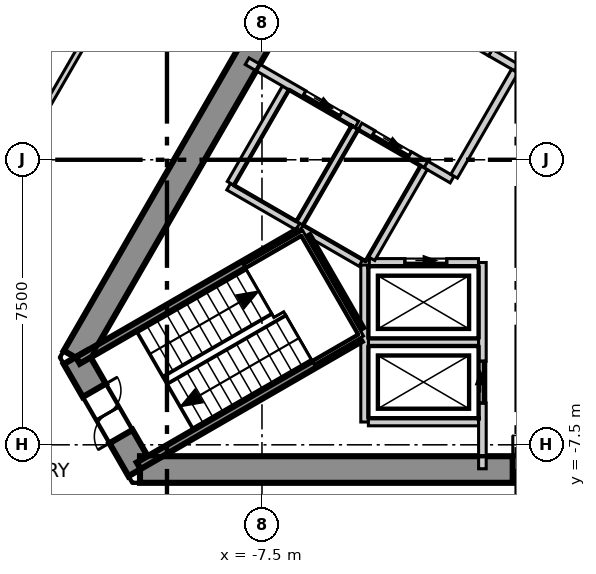
"""IFC4 building model, lengths in metres.
Left out: names, types, materials, properties, quantities, classifications, styles, units other than length and angle.
Written with IfcOpenShell. Run it as: python <this file> out.ifc"""

import sys

from ifc_helpers import new_model, si_unit, direction, frame, frame_2d, origin, place, context, subcontext, project, spatial, polyline, rectangle, outline, extrude, element, fill, save


model = new_model("IFC4")
c1 = context("Model", 3, precision=1e-05, world=origin(), true_north=direction((0.0, 1.0)))
c2 = subcontext(c1, "Body", "Model", "MODEL_VIEW")
j1 = project(units=[si_unit("LENGTHUNIT", "METRE"), si_unit("PLANEANGLEUNIT", "RADIAN")], contexts=[c1])
p1 = place(None, origin())
s1 = spatial("IfcSite", under=j1, at=p1, CompositionType="ELEMENT")
p2 = place(p1, origin())
s2 = spatial("IfcBuilding", under=s1, at=p2, CompositionType="ELEMENT")
p3 = place(p2, frame((0.0, 0.0, 239.3)))
s3 = spatial("IfcBuildingStorey", under=s2, at=p3, CompositionType="ELEMENT", Elevation=239.3)
p4 = place(p3, frame((-1.703, 13.35, -0.3), z_axis=(0.0, 0.0, 1.0), x_axis=(-0.500011533395, -0.866018744874, 0.0)))
e1 = element("IfcWall", 1, at=p4, inside=s3, PredefinedType="SHEAR", context=c2, shape_type="SweptSolid", body=[
    extrude(outline(polyline([(-0.202, -0.35), (1.782, -0.35), (3.766, -0.35), (5.75, -0.35), (7.734, -0.35), (9.718, -0.35), (11.702, -0.35), (13.686, -0.35), (15.67, -0.35), (17.654, -0.35), (19.638, -0.35), (21.622, -0.35), (21.218, 0.35), (19.307, 0.35), (17.397, 0.35), (15.486, 0.35), (13.576, 0.35), (11.665, 0.35), (9.755, 0.35), (7.844, 0.35), (5.934, 0.35), (4.023, 0.35), (2.113, 0.35), (0.202, 0.35), (-0.202, -0.35)])), origin(), (0.0, 0.0, 1.0), 4.0),
])
p5 = place(p4, frame((10.16, 0.0, 0.3)))
e2 = element("IfcOpeningElement", 2, at=p5, cuts=e1, PredefinedType="OPENING", context=c2, shape_type="SweptSolid", body=[
    extrude(rectangle(XDim=1.1, YDim=2.1, at=frame_2d((0.55, 1.05))), frame((0.0, 0.36, 0.0), z_axis=(0.0, -1.0, 0.0), x_axis=(1.0, 0.0, 0.0)), (0.0, 0.0, 1.0), 0.72),
])
p6 = place(p3, frame((-12.413, -5.2, -0.3), z_axis=(0.0, 0.0, 1.0), x_axis=(0.49999337185, -0.866029230515, 0.0)))
e3 = element("IfcWall", 3, at=p6, inside=s3, PredefinedType="SHEAR", context=c2, shape_type="SweptSolid", body=[
    extrude(outline(polyline([(-0.202, -0.35), (1.703, -0.35), (3.608, -0.35), (3.204, 0.35), (1.703, 0.35), (0.202, 0.35), (-0.202, -0.35)])), origin(), (0.0, 0.0, 1.0), 4.0),
])
p7 = place(p6, frame((1.003, 0.0, 0.3)))
e4 = element("IfcOpeningElement", 4, at=p7, cuts=e3, PredefinedType="OPENING", context=c2, shape_type="SweptSolid", body=[
    extrude(rectangle(XDim=1.4, YDim=2.1, at=frame_2d((0.7, 1.05))), frame((0.0, 0.36, 0.0), z_axis=(0.0, -1.0, 0.0), x_axis=(1.0, 0.0, 0.0)), (0.0, 0.0, 1.0), 0.72),
])
p8 = place(p3, frame((-10.71, -8.15, -0.3), z_axis=(0.0, 0.0, 1.0), x_axis=(1.0, 0.0, 0.0)))
e5 = element("IfcWall", 5, at=p8, inside=s3, PredefinedType="SHEAR", context=c2, shape_type="SweptSolid", body=[
    extrude(outline(polyline([(-0.202, -0.35), (1.782, -0.35), (3.766, -0.35), (5.75, -0.35), (7.734, -0.35), (9.718, -0.35), (11.702, -0.35), (13.686, -0.35), (15.67, -0.35), (17.654, -0.35), (19.638, -0.35), (21.622, -0.35), (21.218, 0.35), (19.307, 0.35), (17.397, 0.35), (15.486, 0.35), (13.576, 0.35), (11.665, 0.35), (9.755, 0.35), (7.844, 0.35), (5.934, 0.35), (4.023, 0.35), (2.113, 0.35), (0.202, 0.35), (-0.202, -0.35)])), origin(), (0.0, 0.0, 1.0), 4.0),
])
p9 = place(p8, frame((9.81, 0.0, 0.3)))
e6 = element("IfcOpeningElement", 6, at=p9, cuts=e5, PredefinedType="OPENING", context=c2, shape_type="SweptSolid", body=[
    extrude(rectangle(XDim=1.8, YDim=2.1, at=frame_2d((0.9, 1.05))), frame((0.0, 0.36, 0.0), z_axis=(0.0, -1.0, 0.0), x_axis=(1.0, 0.0, 0.0)), (0.0, 0.0, 1.0), 0.72),
])
p10 = place(p3, frame((-2.687, 29.995, 0.0), z_axis=(0.0, 0.0, 1.0), x_axis=(-0.499992950893, -0.86602947355, 0.0)))
e7 = element("IfcWall", 7, at=p10, inside=s3, PredefinedType="ELEMENTEDWALL", context=c2, shape_type="SweptSolid", body=[
    extrude(rectangle(XDim=49.247, YDim=0.2, at=frame_2d((24.624, 0.0))), origin(), (0.0, 0.0, 1.0), 3.7),
])
p11 = place(p10, frame((2.119, 0.0, 0.9)))
e8 = element("IfcOpeningElement", 8, at=p11, cuts=e7, PredefinedType="OPENING", context=c2, shape_type="SweptSolid", body=[
    extrude(rectangle(XDim=4.2, YDim=2.5, at=frame_2d((2.1, 1.25))), frame((0.0, 0.11, 0.0), z_axis=(0.0, -1.0, 0.0), x_axis=(1.0, 0.0, 0.0)), (0.0, 0.0, 1.0), 0.22),
])
p12 = place(p10, frame((7.951, 0.0, 0.9)))
e9 = element("IfcOpeningElement", 9, at=p12, cuts=e7, PredefinedType="OPENING", context=c2, shape_type="SweptSolid", body=[
    extrude(rectangle(XDim=4.2, YDim=2.5, at=frame_2d((2.1, 1.25))), frame((0.0, 0.11, 0.0), z_axis=(0.0, -1.0, 0.0), x_axis=(1.0, 0.0, 0.0)), (0.0, 0.0, 1.0), 0.22),
])
p13 = place(p10, frame((13.784, 0.0, 0.9)))
e10 = element("IfcOpeningElement", 10, at=p13, cuts=e7, PredefinedType="OPENING", context=c2, shape_type="SweptSolid", body=[
    extrude(rectangle(XDim=4.2, YDim=2.5, at=frame_2d((2.1, 1.25))), frame((0.0, 0.11, 0.0), z_axis=(0.0, -1.0, 0.0), x_axis=(1.0, 0.0, 0.0)), (0.0, 0.0, 1.0), 0.22),
])
p14 = place(p10, frame((19.617, 0.0, 0.9)))
e11 = element("IfcOpeningElement", 11, at=p14, cuts=e7, PredefinedType="OPENING", context=c2, shape_type="SweptSolid", body=[
    extrude(rectangle(XDim=4.2, YDim=2.5, at=frame_2d((2.1, 1.25))), frame((0.0, 0.11, 0.0), z_axis=(0.0, -1.0, 0.0), x_axis=(1.0, 0.0, 0.0)), (0.0, 0.0, 1.0), 0.22),
])
p15 = place(p10, frame((25.449, 0.0, 0.9)))
e12 = element("IfcOpeningElement", 12, at=p15, cuts=e7, PredefinedType="OPENING", context=c2, shape_type="SweptSolid", body=[
    extrude(rectangle(XDim=4.2, YDim=2.5, at=frame_2d((2.1, 1.25))), frame((0.0, 0.11, 0.0), z_axis=(0.0, -1.0, 0.0), x_axis=(1.0, 0.0, 0.0)), (0.0, 0.0, 1.0), 0.22),
])
p16 = place(p10, frame((31.282, 0.0, 0.9)))
e13 = element("IfcOpeningElement", 13, at=p16, cuts=e7, PredefinedType="OPENING", context=c2, shape_type="SweptSolid", body=[
    extrude(rectangle(XDim=4.2, YDim=2.5, at=frame_2d((2.1, 1.25))), frame((0.0, 0.11, 0.0), z_axis=(0.0, -1.0, 0.0), x_axis=(1.0, 0.0, 0.0)), (0.0, 0.0, 1.0), 0.22),
])
p17 = place(p10, frame((37.115, 0.0, 0.9)))
e14 = element("IfcOpeningElement", 14, at=p17, cuts=e7, PredefinedType="OPENING", context=c2, shape_type="SweptSolid", body=[
    extrude(rectangle(XDim=4.2, YDim=2.5, at=frame_2d((2.1, 1.25))), frame((0.0, 0.11, 0.0), z_axis=(0.0, -1.0, 0.0), x_axis=(1.0, 0.0, 0.0)), (0.0, 0.0, 1.0), 0.22),
])
p18 = place(p10, frame((42.947, 0.0, 0.9)))
e15 = element("IfcOpeningElement", 15, at=p18, cuts=e7, PredefinedType="OPENING", context=c2, shape_type="SweptSolid", body=[
    extrude(rectangle(XDim=4.2, YDim=2.5, at=frame_2d((2.1, 1.25))), frame((0.0, 0.11, 0.0), z_axis=(0.0, -1.0, 0.0), x_axis=(1.0, 0.0, 0.0)), (0.0, 0.0, 1.0), 0.22),
])
p19 = place(p3, frame((-20.883, -11.97, 0.0), z_axis=(0.0, 0.0, 1.0), x_axis=(0.500006150555, 0.866021852731, 0.0)))
e16 = element("IfcWall", 16, at=p19, inside=s3, PredefinedType="PARTITIONING", context=c2, shape_type="SweptSolid", body=[
    extrude(rectangle(XDim=41.766, YDim=0.15, at=frame_2d((20.883, 0.0))), origin(), (0.0, 0.0, 1.0), 3.7),
])
p20 = place(p19, frame((36.616, 0.0, 0.0)))
e17 = element("IfcOpeningElement", 17, at=p20, cuts=e16, PredefinedType="OPENING", context=c2, shape_type="SweptSolid", body=[
    extrude(rectangle(XDim=1.1, YDim=2.1, at=frame_2d((0.55, 1.05))), frame((0.0, 0.085, 0.0), z_axis=(0.0, -1.0, 0.0), x_axis=(1.0, 0.0, 0.0)), (0.0, 0.0, 1.0), 0.17),
])
p21 = place(p19, frame((21.723, 0.0, 0.0)))
e18 = element("IfcOpeningElement", 18, at=p21, cuts=e16, PredefinedType="OPENING", context=c2, shape_type="SweptSolid", body=[
    extrude(rectangle(XDim=1.1, YDim=2.1, at=frame_2d((0.55, 1.05))), frame((0.0, 0.085, 0.0), z_axis=(0.0, -1.0, 0.0), x_axis=(1.0, 0.0, 0.0)), (0.0, 0.0, 1.0), 0.17),
])
p22 = place(p19, frame((30.423, 0.0, 0.0)))
e19 = element("IfcOpeningElement", 19, at=p22, cuts=e16, PredefinedType="OPENING", context=c2, shape_type="SweptSolid", body=[
    extrude(rectangle(XDim=0.9, YDim=2.1, at=frame_2d((0.45, 1.05))), frame((0.0, 0.085, 0.0), z_axis=(0.0, -1.0, 0.0), x_axis=(1.0, 0.0, 0.0)), (0.0, 0.0, 1.0), 0.17),
])
p23 = place(p19, frame((27.223, 0.0, 0.0)))
e20 = element("IfcOpeningElement", 20, at=p23, cuts=e16, PredefinedType="OPENING", context=c2, shape_type="SweptSolid", body=[
    extrude(rectangle(XDim=0.9, YDim=2.1, at=frame_2d((0.45, 1.05))), frame((0.0, 0.085, 0.0), z_axis=(0.0, -1.0, 0.0), x_axis=(1.0, 0.0, 0.0)), (0.0, 0.0, 1.0), 0.17),
])
p24 = place(p19, frame((24.323, 0.0, 0.0)))
e21 = element("IfcOpeningElement", 21, at=p24, cuts=e16, PredefinedType="OPENING", context=c2, shape_type="SweptSolid", body=[
    extrude(rectangle(XDim=1.0, YDim=2.1, at=frame_2d((0.5, 1.05))), frame((0.0, 0.085, 0.0), z_axis=(0.0, -1.0, 0.0), x_axis=(1.0, 0.0, 0.0)), (0.0, 0.0, 1.0), 0.17),
])
p25 = place(p19, frame((17.358, 0.0, 0.0)))
e22 = element("IfcOpeningElement", 22, at=p25, cuts=e16, PredefinedType="OPENING", context=c2, shape_type="SweptSolid", body=[
    extrude(rectangle(XDim=1.0, YDim=2.1, at=frame_2d((0.5, 1.05))), frame((0.0, 0.085, 0.0), z_axis=(0.0, -1.0, 0.0), x_axis=(1.0, 0.0, 0.0)), (0.0, 0.0, 1.0), 0.17),
])
p26 = place(p19, frame((6.825, 0.0, 0.0)))
e23 = element("IfcOpeningElement", 23, at=p26, cuts=e16, PredefinedType="OPENING", context=c2, shape_type="SweptSolid", body=[
    extrude(rectangle(XDim=1.1, YDim=2.1, at=frame_2d((0.55, 1.05))), frame((0.0, 0.085, 0.0), z_axis=(0.0, -1.0, 0.0), x_axis=(1.0, 0.0, 0.0)), (0.0, 0.0, 1.0), 0.17),
])
p27 = place(p3, frame((-8.376, -0.707, 0.0), z_axis=(0.0, 0.0, 1.0), x_axis=(0.866067520717, -0.499927044236, 0.0)))
e24 = element("IfcWall", 24, at=p27, inside=s3, PredefinedType="SOLIDWALL", context=c2, shape_type="SweptSolid", body=[
    extrude(rectangle(XDim=2.1, YDim=0.2, at=frame_2d((1.05, 0.0))), origin(), (0.0, 0.0, 1.0), 3.7),
])
p28 = place(p3, frame((-8.326, -0.62, 0.0), z_axis=(0.0, 0.0, 1.0), x_axis=(0.500023687443, 0.866011727401, 0.0)))
e25 = element("IfcWall", 25, at=p28, inside=s3, PredefinedType="SOLIDWALL", context=c2, shape_type="SweptSolid", body=[
    extrude(rectangle(XDim=2.9, YDim=0.2, at=frame_2d((1.45, 0.0))), origin(), (0.0, 0.0, 1.0), 3.7),
])
p29 = place(p3, frame((-4.7, -4.8, 0.0), z_axis=(0.0, 0.0, 1.0), x_axis=(1.0, 0.0, 0.0)))
e26 = element("IfcWall", 26, at=p29, inside=s3, PredefinedType="SOLIDWALL", context=c2, shape_type="SweptSolid", body=[
    extrude(rectangle(XDim=2.9, YDim=0.2, at=frame_2d((1.45, 0.0))), origin(), (0.0, 0.0, 1.0), 3.7),
])
p30 = place(p3, frame((-4.8, -6.9, 0.0), z_axis=(0.0, 0.0, 1.0), x_axis=(0.0, 1.0, 0.0)))
e27 = element("IfcWall", 27, at=p30, inside=s3, PredefinedType="SOLIDWALL", context=c2, shape_type="SweptSolid", body=[
    extrude(rectangle(XDim=4.131, YDim=0.2, at=frame_2d((2.065, 0.0))), origin(), (0.0, 0.0, 1.0), 3.7),
])
p31 = place(p3, frame((-4.7, -6.9, 0.0), z_axis=(0.0, 0.0, 1.0), x_axis=(1.0, 0.0, 0.0)))
e28 = element("IfcWall", 28, at=p31, inside=s3, PredefinedType="SOLIDWALL", context=c2, shape_type="SweptSolid", body=[
    extrude(rectangle(XDim=2.9, YDim=0.2, at=frame_2d((1.45, 0.0))), origin(), (0.0, 0.0, 1.0), 3.7),
])
p32 = place(p3, frame((-1.7, -8.13, 0.0), z_axis=(0.0, 0.0, 1.0), x_axis=(0.0, 1.0, 0.0)))
e29 = element("IfcWall", 29, at=p32, inside=s3, PredefinedType="SOLIDWALL", context=c2, shape_type="SweptSolid", body=[
    extrude(rectangle(XDim=5.427, YDim=0.2, at=frame_2d((2.713, 0.0))), origin(), (0.0, 0.0, 1.0), 3.7),
])
p33 = place(p32, frame((1.73, 0.0, 0.0)))
e30 = element("IfcOpeningElement", 30, at=p33, cuts=e29, PredefinedType="OPENING", context=c2, shape_type="SweptSolid", body=[
    extrude(rectangle(XDim=1.1, YDim=2.1, at=frame_2d((0.55, 1.05))), frame((0.0, 0.11, 0.0), z_axis=(0.0, -1.0, 0.0), x_axis=(1.0, 0.0, 0.0)), (0.0, 0.0, 1.0), 0.22),
])
p34 = place(p3, frame((-4.676, -2.7, 0.0), z_axis=(0.0, 0.0, 1.0), x_axis=(1.0, 0.0, 0.0)))
e31 = element("IfcWall", 31, at=p34, inside=s3, PredefinedType="SOLIDWALL", context=c2, shape_type="SweptSolid", body=[
    extrude(rectangle(XDim=2.873, YDim=0.2, at=frame_2d((1.437, 0.0))), origin(), (0.0, 0.0, 1.0), 3.7),
])
p35 = place(p34, frame((0.937, 0.0, 0.0)))
e32 = element("IfcOpeningElement", 32, at=p35, cuts=e31, PredefinedType="OPENING", context=c2, shape_type="SweptSolid", body=[
    extrude(rectangle(XDim=1.1, YDim=2.1, at=frame_2d((0.55, 1.05))), frame((0.0, 0.11, 0.0), z_axis=(0.0, -1.0, 0.0), x_axis=(1.0, 0.0, 0.0)), (0.0, 0.0, 1.0), 0.22),
])
p36 = place(p3, frame((-7.891, 2.593, 0.0), z_axis=(0.0, 0.0, 1.0), x_axis=(0.866070917804, -0.499921159118, 0.0)))
e33 = element("IfcWall", 33, at=p36, inside=s3, PredefinedType="SOLIDWALL", context=c2, shape_type="SweptSolid", body=[
    extrude(rectangle(XDim=3.333, YDim=0.2, at=frame_2d((1.666, 0.0))), origin(), (0.0, 0.0, 1.0), 3.7),
])
p37 = place(p36, frame((1.73, 0.0, 0.0)))
e34 = element("IfcOpeningElement", 34, at=p37, cuts=e33, PredefinedType="OPENING", context=c2, shape_type="SweptSolid", body=[
    extrude(rectangle(XDim=1.1, YDim=2.1, at=frame_2d((0.55, 1.05))), frame((0.0, 0.11, 0.0), z_axis=(0.0, -1.0, 0.0), x_axis=(1.0, 0.0, 0.0)), (0.0, 0.0, 1.0), 0.22),
])
p38 = place(p3, frame((-3.188, -0.122, 0.0), z_axis=(0.0, 0.0, 1.0), x_axis=(0.865705793592, -0.50055317294, 0.0)))
e35 = element("IfcWall", 35, at=p38, inside=s3, PredefinedType="SOLIDWALL", context=c2, shape_type="SweptSolid", body=[
    extrude(rectangle(XDim=0.797, YDim=0.2, at=frame_2d((0.398, 0.0))), origin(), (0.0, 0.0, 1.0), 3.7),
])
p39 = place(p3, frame((-1.488, 2.822, 0.0), z_axis=(0.0, 0.0, 1.0), x_axis=(0.866236612152, -0.499633997809, 0.0)))
e36 = element("IfcWall", 36, at=p39, inside=s3, PredefinedType="SOLIDWALL", context=c2, shape_type="SweptSolid", body=[
    extrude(rectangle(XDim=0.796, YDim=0.2, at=frame_2d((0.398, 0.0))), origin(), (0.0, 0.0, 1.0), 3.7),
])
p40 = place(p3, frame((-2.444, -0.433, 0.0), z_axis=(0.0, 0.0, 1.0), x_axis=(0.500035624827, 0.866004834804, 0.0)))
e37 = element("IfcWall", 37, at=p40, inside=s3, PredefinedType="SOLIDWALL", context=c2, shape_type="SweptSolid", body=[
    extrude(rectangle(XDim=3.194, YDim=0.2, at=frame_2d((1.597, 0.0))), origin(), (0.0, 0.0, 1.0), 3.7),
])
p41 = place(p3, frame((-6.507, -1.67, 0.0), z_axis=(0.0, 0.0, 1.0), x_axis=(0.50012328804, 0.865954211699, 0.0)))
e38 = element("IfcWall", 38, at=p41, inside=s3, PredefinedType="SOLIDWALL", context=c2, shape_type="SweptSolid", body=[
    extrude(rectangle(XDim=2.9, YDim=0.2, at=frame_2d((1.45, 0.0))), origin(), (0.0, 0.0, 1.0), 3.7),
])
p42 = place(p3, frame((-6.47, -1.807, 0.0), z_axis=(0.0, 0.0, 1.0), x_axis=(0.865883195159, -0.500246231712, 0.0)))
e39 = element("IfcWall", 39, at=p42, inside=s3, PredefinedType="SOLIDWALL", context=c2, shape_type="SweptSolid", body=[
    extrude(rectangle(XDim=1.815, YDim=0.2, at=frame_2d((0.908, 0.0))), origin(), (0.0, 0.0, 1.0), 3.7),
])
p43 = place(p3, frame((-4.922, 0.879, 0.0), z_axis=(0.0, 0.0, 1.0), x_axis=(0.866073918653, -0.499915960366, 0.0)))
e40 = element("IfcWall", 40, at=p43, inside=s3, PredefinedType="SOLIDWALL", context=c2, shape_type="SweptSolid", body=[
    extrude(rectangle(XDim=2.002, YDim=0.2, at=frame_2d((1.001, 0.0))), origin(), (0.0, 0.0, 1.0), 3.7),
])
p44 = place(p43, frame((0.402, 0.0, 0.0)))
e41 = element("IfcOpeningElement", 41, at=p44, cuts=e40, PredefinedType="OPENING", context=c2, shape_type="SweptSolid", body=[
    extrude(rectangle(XDim=1.1, YDim=2.1, at=frame_2d((0.55, 1.05))), frame((0.0, 0.11, 0.0), z_axis=(0.0, -1.0, 0.0), x_axis=(1.0, 0.0, 0.0)), (0.0, 0.0, 1.0), 0.22),
])
p45 = place(p3, frame((-4.619, -2.6, 0.0), z_axis=(0.0, 0.0, 1.0), x_axis=(0.50009492287, 0.865970593103, 0.0)))
e42 = element("IfcWall", 42, at=p45, inside=s3, PredefinedType="SOLIDWALL", context=c2, shape_type="SweptSolid", body=[
    extrude(rectangle(XDim=2.761, YDim=0.2, at=frame_2d((1.381, 0.0))), origin(), (0.0, 0.0, 1.0), 3.7),
])
p46 = place(p3, frame((-3.309, 3.873, 0.0), z_axis=(0.0, 0.0, 1.0), x_axis=(0.866098583652, -0.499873227325, 0.0)))
e43 = element("IfcWall", 43, at=p46, inside=s3, PredefinedType="SOLIDWALL", context=c2, shape_type="SweptSolid", body=[
    extrude(rectangle(XDim=2.103, YDim=0.2, at=frame_2d((1.051, 0.0))), origin(), (0.0, 0.0, 1.0), 3.7),
])
p47 = place(p46, frame((0.502, 0.0, 0.0)))
e44 = element("IfcOpeningElement", 44, at=p47, cuts=e43, PredefinedType="OPENING", context=c2, shape_type="SweptSolid", body=[
    extrude(rectangle(XDim=1.1, YDim=2.1, at=frame_2d((0.55, 1.05))), frame((0.0, 0.11, 0.0), z_axis=(0.0, -1.0, 0.0), x_axis=(1.0, 0.0, 0.0)), (0.0, 0.0, 1.0), 0.22),
])
p48 = place(p3, frame((-12.344, -5.279, 0.0), z_axis=(0.0, 0.0, 1.0), x_axis=(0.866046323291, 0.499963764601, 0.0)))
e45 = element("IfcWall", 45, at=p48, inside=s3, PredefinedType="SOLIDWALL", context=c2, shape_type="SweptSolid", body=[
    extrude(rectangle(XDim=6.714, YDim=0.2, at=frame_2d((3.357, 0.0))), origin(), (0.0, 0.0, 1.0), 3.7),
])
p49 = place(p3, frame((-6.329, -2.038, 0.0), z_axis=(0.0, 0.0, 1.0), x_axis=(0.500200581029, -0.865909567298, 0.0)))
e46 = element("IfcWall", 46, at=p49, inside=s3, PredefinedType="SOLIDWALL", context=c2, shape_type="SweptSolid", body=[
    extrude(rectangle(XDim=2.799, YDim=0.2, at=frame_2d((1.399, 0.0))), origin(), (0.0, 0.0, 1.0), 3.7),
])
p50 = place(p3, frame((-10.744, -8.051, 0.0), z_axis=(0.0, 0.0, 1.0), x_axis=(0.865983344943, 0.500072840975, 0.0)))
e47 = element("IfcWall", 47, at=p50, inside=s3, PredefinedType="SOLIDWALL", context=c2, shape_type="SweptSolid", body=[
    extrude(rectangle(XDim=6.715, YDim=0.2, at=frame_2d((3.357, 0.0))), origin(), (0.0, 0.0, 1.0), 3.7),
])
p51 = place(p35, origin())
e48 = element("IfcDoor", 48, at=p51, inside=s3, OperationType="SLIDING_TO_LEFT", PredefinedType="DOOR", context=c2, shape_type="SweptSolid", body=[
    extrude(rectangle(XDim=1.1, YDim=2.1, at=frame_2d((0.55, 1.05))), frame((0.0, 0.025, 0.0), z_axis=(0.0, -1.0, 0.0), x_axis=(1.0, 0.0, 0.0)), (0.0, 0.0, 1.0), 0.05),
])
fill(e32, e48)
p52 = place(p33, origin())
e49 = element("IfcDoor", 49, at=p52, inside=s3, OperationType="SLIDING_TO_LEFT", PredefinedType="DOOR", context=c2, shape_type="SweptSolid", body=[
    extrude(rectangle(XDim=1.1, YDim=2.1, at=frame_2d((0.55, 1.05))), frame((0.0, 0.025, 0.0), z_axis=(0.0, -1.0, 0.0), x_axis=(1.0, 0.0, 0.0)), (0.0, 0.0, 1.0), 0.05),
])
fill(e30, e49)
p53 = place(p44, origin())
e50 = element("IfcDoor", 50, at=p53, inside=s3, OperationType="SLIDING_TO_LEFT", PredefinedType="DOOR", context=c2, shape_type="SweptSolid", body=[
    extrude(rectangle(XDim=1.1, YDim=2.1, at=frame_2d((0.55, 1.05))), frame((0.0, 0.025, 0.0), z_axis=(0.0, -1.0, 0.0), x_axis=(1.0, 0.0, 0.0)), (0.0, 0.0, 1.0), 0.05),
])
fill(e41, e50)
p54 = place(p37, origin())
e51 = element("IfcDoor", 51, at=p54, inside=s3, OperationType="SLIDING_TO_LEFT", PredefinedType="DOOR", context=c2, shape_type="SweptSolid", body=[
    extrude(rectangle(XDim=1.1, YDim=2.1, at=frame_2d((0.55, 1.05))), frame((0.0, 0.025, 0.0), z_axis=(0.0, -1.0, 0.0), x_axis=(1.0, 0.0, 0.0)), (0.0, 0.0, 1.0), 0.05),
])
fill(e34, e51)
p55 = place(p9, origin())
e52 = element("IfcDoor", 52, at=p55, inside=s3, OperationType="DOUBLE_DOOR_SINGLE_SWING", PredefinedType="DOOR", context=c2, shape_type="SweptSolid", body=[
    extrude(rectangle(XDim=1.8, YDim=2.1, at=frame_2d((0.9, 1.05))), frame((0.0, 0.025, 0.0), z_axis=(0.0, -1.0, 0.0), x_axis=(1.0, 0.0, 0.0)), (0.0, 0.0, 1.0), 0.05),
])
fill(e6, e52)
p56 = place(p7, origin())
e53 = element("IfcDoor", 53, at=p56, inside=s3, OperationType="DOUBLE_DOOR_SINGLE_SWING", PredefinedType="DOOR", context=c2, shape_type="SweptSolid", body=[
    extrude(rectangle(XDim=1.4, YDim=2.1, at=frame_2d((0.7, 1.05))), frame((0.0, 0.025, 0.0), z_axis=(0.0, -1.0, 0.0), x_axis=(1.0, 0.0, 0.0)), (0.0, 0.0, 1.0), 0.05),
])
fill(e4, e53)
save(model, sys.argv[1])
